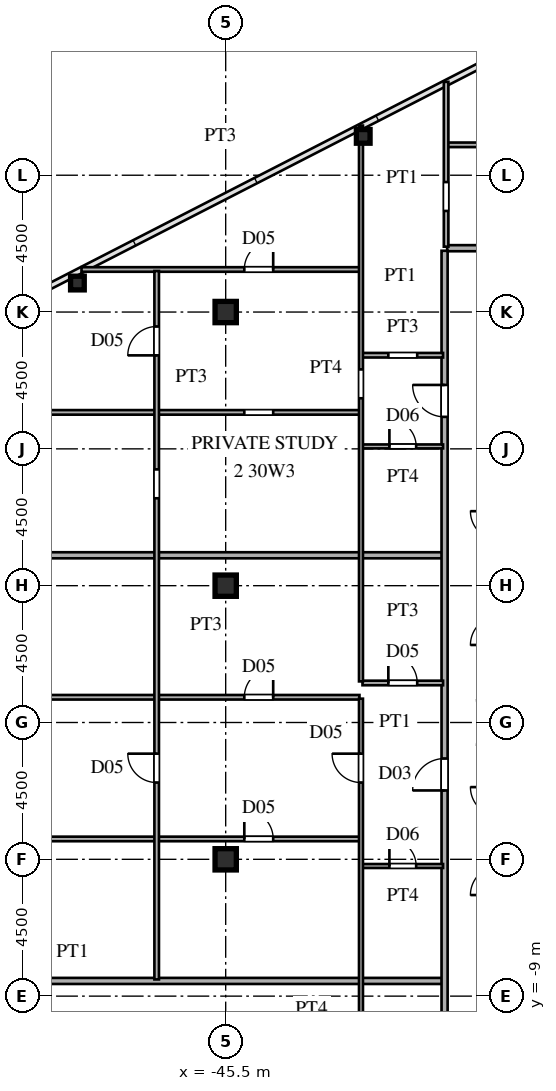
"""IFC4 building model, lengths in metres.
Left out: names, types, materials, properties, quantities, classifications, styles, units other than length and angle.
Written with IfcOpenShell. Run it as: python <this file> out.ifc"""

import sys

from ifc_helpers import new_model, si_unit, direction, frame, frame_2d, origin, origin_2d, place, context, subcontext, project, spatial, rectangle, hollow_rectangle, i_section, extrude, source, transform, mapped, element, fill, save


model = new_model("IFC4")
c1 = context("Model", 3, precision=1e-05, world=origin(), true_north=direction((0.0, 1.0)))
c2 = subcontext(c1, "Body", "Model", "MODEL_VIEW")
j1 = project(units=[si_unit("LENGTHUNIT", "METRE"), si_unit("PLANEANGLEUNIT", "RADIAN")], contexts=[c1])
p1 = place(None, origin())
s1 = spatial("IfcSite", under=j1, at=p1, CompositionType="ELEMENT")
p2 = place(p1, origin())
s2 = spatial("IfcBuilding", under=s1, at=p2, CompositionType="ELEMENT")
p3 = place(p2, frame((0.0, 0.0, 114.0)))
s3 = spatial("IfcBuildingStorey", under=s2, at=p3, CompositionType="ELEMENT", Elevation=114.0)
m1 = source(origin(), c2, "Body", "SweptSolid", [
    extrude(i_section(OverallWidth=0.7, OverallDepth=0.7, WebThickness=0.028, FlangeThickness=0.045, at=origin_2d()), origin(), (0.0, 0.0, 1.0), 3.6),
])
for number, where, z_axis, x_axis in (
    (1, (-45.5, -4.5, 0.0), (0.0, 0.0, 1.0), (1.0, 0.0, 0.0)),
    (2, (-45.5, 4.5, 0.0), (0.0, 0.0, 1.0), (1.0, 0.0, 0.0)),
    (3, (-45.5, 13.5, 0.0), (0.0, 0.0, 1.0), (1.0, 0.0, 0.0)),
):
    element("IfcColumn", number, at=place(p3, frame(where, z_axis=z_axis, x_axis=x_axis)), inside=s3, PredefinedType="COLUMN", context=c2, shape_type="MappedRepresentation", body=[
        mapped(m1, transform((0.0, 0.0, 0.0), scale=1.0)),
    ])
m2 = source(origin(), c2, "Body", "SweptSolid", [
    extrude(hollow_rectangle(XDim=0.45, YDim=0.45, WallThickness=0.018, at=origin_2d()), origin(), (0.0, 0.0, 1.0), 3.6),
])
for number, where, z_axis, x_axis in (
    (4, (-40.976, 19.278, 0.0), (0.0, 0.0, 1.0), (1.0, 0.0, 0.0)),
    (5, (-50.377, 14.453, 0.0), (0.0, 0.0, 1.0), (1.0, 0.0, 0.0)),
):
    element("IfcColumn", number, at=place(p3, frame(where, z_axis=z_axis, x_axis=x_axis)), inside=s3, PredefinedType="COLUMN", context=c2, shape_type="MappedRepresentation", body=[
        mapped(m2, transform((0.0, 0.0, 0.0), scale=1.0)),
    ])
p4 = place(p3, frame((-62.69, -8.5, 0.0), z_axis=(0.0, 0.0, 1.0), x_axis=(1.0, 0.0, 0.0)))
e6 = element("IfcWall", 6, at=p4, inside=s3, PredefinedType="PARTITIONING", context=c2, shape_type="SweptSolid", body=[
    extrude(rectangle(XDim=24.31, YDim=0.2, at=frame_2d((12.155, 0.0))), origin(), (0.0, 0.0, 1.0), 3.38),
])
p5 = place(p3, frame((-41.0, -4.72, 0.0), z_axis=(0.0, 0.0, 1.0), x_axis=(1.0, 0.0, 0.0)))
e7 = element("IfcWall", 7, at=p5, inside=s3, PredefinedType="PARTITIONING", context=c2, shape_type="SweptSolid", body=[
    extrude(rectangle(XDim=2.65, YDim=0.13, at=frame_2d((1.325, 0.0))), origin(), (0.0, 0.0, 1.0), 3.38),
])
p6 = place(p5, frame((0.885, 0.0, 0.0)))
e8 = element("IfcOpeningElement", 8, at=p6, cuts=e7, PredefinedType="OPENING", context=c2, shape_type="SweptSolid", body=[
    extrude(rectangle(XDim=0.88, YDim=2.1, at=frame_2d((0.44, 1.05))), frame((0.0, 0.075, 0.0), z_axis=(0.0, -1.0, 0.0), x_axis=(1.0, 0.0, 0.0)), (0.0, 0.0, 1.0), 0.15),
])
p7 = place(p3, frame((-69.535, -3.83, 0.0), z_axis=(0.0, 0.0, 1.0), x_axis=(1.0, 0.0, 0.0)))
e9 = element("IfcWall", 9, at=p7, inside=s3, PredefinedType="PARTITIONING", context=c2, shape_type="SweptSolid", body=[
    extrude(rectangle(XDim=28.435, YDim=0.15, at=frame_2d((14.217, 0.0))), origin(), (0.0, 0.0, 1.0), 3.38),
])
p8 = place(p7, frame((24.647, 0.0, 0.0)))
e10 = element("IfcOpeningElement", 10, at=p8, cuts=e9, PredefinedType="OPENING", context=c2, shape_type="SweptSolid", body=[
    extrude(rectangle(XDim=0.95, YDim=2.15, at=frame_2d((0.475, 1.075))), frame((0.0, 0.085, 0.0), z_axis=(0.0, -1.0, 0.0), x_axis=(1.0, 0.0, 0.0)), (0.0, 0.0, 1.0), 0.17),
])
p9 = place(p7, frame((11.71, 0.0, 0.0)))
e11 = element("IfcOpeningElement", 11, at=p9, cuts=e9, PredefinedType="OPENING", context=c2, shape_type="SweptSolid", body=[
    extrude(rectangle(XDim=0.95, YDim=2.15, at=frame_2d((0.475, 1.075))), frame((0.0, 0.085, 0.0), z_axis=(0.0, -1.0, 0.0), x_axis=(1.0, 0.0, 0.0)), (0.0, 0.0, 1.0), 0.17),
])
p10 = place(p3, frame((-69.535, 0.83, 0.0), z_axis=(0.0, 0.0, 1.0), x_axis=(1.0, 0.0, 0.0)))
e12 = element("IfcWall", 12, at=p10, inside=s3, PredefinedType="PARTITIONING", context=c2, shape_type="SweptSolid", body=[
    extrude(rectangle(XDim=28.435, YDim=0.15, at=frame_2d((14.217, 0.0))), origin(), (0.0, 0.0, 1.0), 3.38),
])
p11 = place(p10, frame((24.647, 0.0, 0.0)))
e13 = element("IfcOpeningElement", 13, at=p11, cuts=e12, PredefinedType="OPENING", context=c2, shape_type="SweptSolid", body=[
    extrude(rectangle(XDim=0.95, YDim=2.15, at=frame_2d((0.475, 1.075))), frame((0.0, 0.085, 0.0), z_axis=(0.0, -1.0, 0.0), x_axis=(1.0, 0.0, 0.0)), (0.0, 0.0, 1.0), 0.17),
])
p12 = place(p10, frame((11.71, 0.0, 0.0)))
e14 = element("IfcOpeningElement", 14, at=p12, cuts=e12, PredefinedType="OPENING", context=c2, shape_type="SweptSolid", body=[
    extrude(rectangle(XDim=0.95, YDim=2.15, at=frame_2d((0.475, 1.075))), frame((0.0, 0.085, 0.0), z_axis=(0.0, -1.0, 0.0), x_axis=(1.0, 0.0, 0.0)), (0.0, 0.0, 1.0), 0.17),
])
p13 = place(p3, frame((-41.0, 1.3, 0.0), z_axis=(0.0, 0.0, 1.0), x_axis=(1.0, 0.0, 0.0)))
e15 = element("IfcWall", 15, at=p13, inside=s3, PredefinedType="PARTITIONING", context=c2, shape_type="SweptSolid", body=[
    extrude(rectangle(XDim=2.65, YDim=0.15, at=frame_2d((1.325, 0.0))), origin(), (0.0, 0.0, 1.0), 3.38),
])
p14 = place(p13, frame((0.85, 0.0, 0.0)))
e16 = element("IfcOpeningElement", 16, at=p14, cuts=e15, PredefinedType="OPENING", context=c2, shape_type="SweptSolid", body=[
    extrude(rectangle(XDim=0.95, YDim=2.15, at=frame_2d((0.475, 1.075))), frame((0.0, 0.085, 0.0), z_axis=(0.0, -1.0, 0.0), x_axis=(1.0, 0.0, 0.0)), (0.0, 0.0, 1.0), 0.17),
])
p15 = place(p3, frame((-68.458, 5.5, 0.0), z_axis=(0.0, 0.0, 1.0), x_axis=(1.0, 0.0, 0.0)))
e17 = element("IfcWall", 17, at=p15, inside=s3, PredefinedType="PARTITIONING", context=c2, shape_type="SweptSolid", body=[
    extrude(rectangle(XDim=30.079, YDim=0.2, at=frame_2d((15.039, 0.0))), origin(), (0.0, 0.0, 1.0), 3.38),
])
p16 = place(p3, frame((-41.0, 9.08, 0.0), z_axis=(0.0, 0.0, 1.0), x_axis=(1.0, 0.0, 0.0)))
e18 = element("IfcWall", 18, at=p16, inside=s3, PredefinedType="PARTITIONING", context=c2, shape_type="SweptSolid", body=[
    extrude(rectangle(XDim=2.65, YDim=0.13, at=frame_2d((1.325, 0.0))), origin(), (0.0, 0.0, 1.0), 3.38),
])
p17 = place(p16, frame((0.885, 0.0, 0.0)))
e19 = element("IfcOpeningElement", 19, at=p17, cuts=e18, PredefinedType="OPENING", context=c2, shape_type="SweptSolid", body=[
    extrude(rectangle(XDim=0.88, YDim=2.1, at=frame_2d((0.44, 1.05))), frame((0.0, 0.075, 0.0), z_axis=(0.0, -1.0, 0.0), x_axis=(1.0, 0.0, 0.0)), (0.0, 0.0, 1.0), 0.15),
])
p18 = place(p3, frame((-54.45, 10.2, 0.0), z_axis=(0.0, 0.0, 1.0), x_axis=(1.0, 0.0, 0.0)))
e20 = element("IfcWall", 20, at=p18, inside=s3, PredefinedType="PARTITIONING", context=c2, shape_type="SweptSolid", body=[
    extrude(rectangle(XDim=13.35, YDim=0.15, at=frame_2d((6.675, 0.0))), origin(), (0.0, 0.0, 1.0), 3.38),
])
p19 = place(p18, frame((9.562, 0.0, 0.0)))
e21 = element("IfcOpeningElement", 21, at=p19, cuts=e20, PredefinedType="OPENING", context=c2, shape_type="SweptSolid", body=[
    extrude(rectangle(XDim=0.95, YDim=2.15, at=frame_2d((0.475, 1.075))), frame((0.0, 0.085, 0.0), z_axis=(0.0, -1.0, 0.0), x_axis=(1.0, 0.0, 0.0)), (0.0, 0.0, 1.0), 0.17),
])
p20 = place(p3, frame((-41.0, 12.08, 0.0), z_axis=(0.0, 0.0, 1.0), x_axis=(1.0, 0.0, 0.0)))
e22 = element("IfcWall", 22, at=p20, inside=s3, PredefinedType="PARTITIONING", context=c2, shape_type="SweptSolid", body=[
    extrude(rectangle(XDim=2.65, YDim=0.15, at=frame_2d((1.325, 0.0))), origin(), (0.0, 0.0, 1.0), 3.38),
])
p21 = place(p20, frame((0.85, 0.0, 0.0)))
e23 = element("IfcOpeningElement", 23, at=p21, cuts=e22, PredefinedType="OPENING", context=c2, shape_type="SweptSolid", body=[
    extrude(rectangle(XDim=0.95, YDim=2.15, at=frame_2d((0.475, 1.075))), frame((0.0, 0.085, 0.0), z_axis=(0.0, -1.0, 0.0), x_axis=(1.0, 0.0, 0.0)), (0.0, 0.0, 1.0), 0.17),
])
p22 = place(p3, frame((-50.243, 14.9, 0.0), z_axis=(0.0, 0.0, 1.0), x_axis=(1.0, 0.0, 0.0)))
e24 = element("IfcWall", 24, at=p22, inside=s3, PredefinedType="PARTITIONING", context=c2, shape_type="SweptSolid", body=[
    extrude(rectangle(XDim=9.143, YDim=0.15, at=frame_2d((4.571, 0.0))), origin(), (0.0, 0.0, 1.0), 3.38),
])
p23 = place(p22, frame((5.355, 0.0, 0.0)))
e25 = element("IfcOpeningElement", 25, at=p23, cuts=e24, PredefinedType="OPENING", context=c2, shape_type="SweptSolid", body=[
    extrude(rectangle(XDim=0.95, YDim=2.15, at=frame_2d((0.475, 1.075))), frame((0.0, 0.085, 0.0), z_axis=(0.0, -1.0, 0.0), x_axis=(1.0, 0.0, 0.0)), (0.0, 0.0, 1.0), 0.17),
])
p24 = place(p3, frame((-38.215, 15.6, 0.0), z_axis=(0.0, 0.0, 1.0), x_axis=(1.0, 0.0, 0.0)))
e26 = element("IfcWall", 26, at=p24, inside=s3, PredefinedType="PARTITIONING", context=c2, shape_type="SweptSolid", body=[
    extrude(rectangle(XDim=1.63, YDim=0.2, at=frame_2d((0.815, 0.0))), origin(), (0.0, 0.0, 1.0), 3.38),
])
p25 = place(p3, frame((-38.2, 19.0, 0.0), z_axis=(0.0, 0.0, 1.0), x_axis=(1.0, 0.0, 0.0)))
e27 = element("IfcWall", 27, at=p25, inside=s3, PredefinedType="PARTITIONING", context=c2, shape_type="SweptSolid", body=[
    extrude(rectangle(XDim=10.735, YDim=0.15, at=frame_2d((5.367, 0.0))), origin(), (0.0, 0.0, 1.0), 3.38),
])
p26 = place(p25, frame((4.85, 0.0, 0.0)))
e28 = element("IfcOpeningElement", 28, at=p26, cuts=e27, PredefinedType="OPENING", context=c2, shape_type="SweptSolid", body=[
    extrude(rectangle(XDim=0.95, YDim=2.15, at=frame_2d((0.475, 1.075))), frame((0.0, 0.085, 0.0), z_axis=(0.0, -1.0, 0.0), x_axis=(1.0, 0.0, 0.0)), (0.0, 0.0, 1.0), 0.17),
])
p27 = place(p3, frame((-47.77, -8.45, 0.0), z_axis=(0.0, 0.0, 1.0), x_axis=(0.0, 1.0, 0.0)))
e29 = element("IfcWall", 29, at=p27, inside=s3, PredefinedType="PARTITIONING", context=c2, shape_type="SweptSolid", body=[
    extrude(rectangle(XDim=23.3, YDim=0.15, at=frame_2d((11.65, 0.0))), origin(), (0.0, 0.0, 1.0), 3.38),
])
p28 = place(p27, frame((6.475, 0.0, 0.0)))
e30 = element("IfcOpeningElement", 30, at=p28, cuts=e29, PredefinedType="OPENING", context=c2, shape_type="SweptSolid", body=[
    extrude(rectangle(XDim=0.95, YDim=2.15, at=frame_2d((0.475, 1.075))), frame((0.0, 0.085, 0.0), z_axis=(0.0, -1.0, 0.0), x_axis=(1.0, 0.0, 0.0)), (0.0, 0.0, 1.0), 0.17),
])
p29 = place(p27, frame((20.525, 0.0, 0.0)))
e31 = element("IfcOpeningElement", 31, at=p29, cuts=e29, PredefinedType="OPENING", context=c2, shape_type="SweptSolid", body=[
    extrude(rectangle(XDim=0.95, YDim=2.15, at=frame_2d((0.475, 1.075))), frame((0.0, 0.085, 0.0), z_axis=(0.0, -1.0, 0.0), x_axis=(1.0, 0.0, 0.0)), (0.0, 0.0, 1.0), 0.17),
])
p30 = place(p27, frame((15.825, 0.0, 0.0)))
e32 = element("IfcOpeningElement", 32, at=p30, cuts=e29, PredefinedType="OPENING", context=c2, shape_type="SweptSolid", body=[
    extrude(rectangle(XDim=0.95, YDim=2.15, at=frame_2d((0.475, 1.075))), frame((0.0, 0.085, 0.0), z_axis=(0.0, -1.0, 0.0), x_axis=(1.0, 0.0, 0.0)), (0.0, 0.0, 1.0), 0.17),
])
p31 = place(p3, frame((-41.05, -19.634, 0.0), z_axis=(0.0, 0.0, 1.0), x_axis=(0.0, 1.0, 0.0)))
e33 = element("IfcWall", 33, at=p31, inside=s3, PredefinedType="PARTITIONING", context=c2, shape_type="SweptSolid", body=[
    extrude(rectangle(XDim=20.417, YDim=0.13, at=frame_2d((10.208, 0.0))), origin(), (0.0, 0.0, 1.0), 2.99),
])
p32 = place(p31, frame((5.987, 0.0, 0.0)))
e34 = element("IfcOpeningElement", 34, at=p32, cuts=e33, PredefinedType="OPENING", context=c2, shape_type="SweptSolid", body=[
    extrude(rectangle(XDim=0.95, YDim=2.15, at=frame_2d((0.475, 1.075))), frame((0.0, 0.075, 0.0), z_axis=(0.0, -1.0, 0.0), x_axis=(1.0, 0.0, 0.0)), (0.0, 0.0, 1.0), 0.15),
])
p33 = place(p31, frame((17.659, 0.0, 0.0)))
e35 = element("IfcOpeningElement", 35, at=p33, cuts=e33, PredefinedType="OPENING", context=c2, shape_type="SweptSolid", body=[
    extrude(rectangle(XDim=0.95, YDim=2.15, at=frame_2d((0.475, 1.075))), frame((0.0, 0.075, 0.0), z_axis=(0.0, -1.0, 0.0), x_axis=(1.0, 0.0, 0.0)), (0.0, 0.0, 1.0), 0.15),
])
p34 = place(p3, frame((-41.05, 1.352, 0.0), z_axis=(0.0, 0.0, 1.0), x_axis=(0.0, 1.0, 0.0)))
e36 = element("IfcWall", 36, at=p34, inside=s3, PredefinedType="PARTITIONING", context=c2, shape_type="SweptSolid", body=[
    extrude(rectangle(XDim=18.282, YDim=0.13, at=frame_2d((9.141, 0.0))), origin(), (0.0, 0.0, 1.0), 2.99),
])
p35 = place(p34, frame((9.312, 0.0, 0.0)))
e37 = element("IfcOpeningElement", 37, at=p35, cuts=e36, PredefinedType="OPENING", context=c2, shape_type="SweptSolid", body=[
    extrude(rectangle(XDim=0.95, YDim=2.15, at=frame_2d((0.475, 1.075))), frame((0.0, 0.075, 0.0), z_axis=(0.0, -1.0, 0.0), x_axis=(1.0, 0.0, 0.0)), (0.0, 0.0, 1.0), 0.15),
])
p36 = place(p3, frame((-38.3, -15.515, 0.0), z_axis=(0.0, 0.0, 1.0), x_axis=(0.0, 1.0, 0.0)))
e38 = element("IfcWall", 38, at=p36, inside=s3, PredefinedType="PARTITIONING", context=c2, shape_type="SweptSolid", body=[
    extrude(rectangle(XDim=31.03, YDim=0.2, at=frame_2d((15.515, 0.0))), origin(), (0.0, 0.0, 1.0), 3.38),
])
p37 = place(p36, frame((2.345, 0.0, 0.0)))
e39 = element("IfcOpeningElement", 39, at=p37, cuts=e38, PredefinedType="OPENING", context=c2, shape_type="SweptSolid", body=[
    extrude(rectangle(XDim=1.05, YDim=2.25, at=frame_2d((0.525, 1.125))), frame((0.0, 0.11, 0.0), z_axis=(0.0, -1.0, 0.0), x_axis=(1.0, 0.0, 0.0)), (0.0, 0.0, 1.0), 0.22),
])
p38 = place(p36, frame((13.28, 0.0, 0.0)))
e40 = element("IfcOpeningElement", 40, at=p38, cuts=e38, PredefinedType="OPENING", context=c2, shape_type="SweptSolid", body=[
    extrude(rectangle(XDim=1.05, YDim=2.25, at=frame_2d((0.525, 1.125))), frame((0.0, 0.11, 0.0), z_axis=(0.0, -1.0, 0.0), x_axis=(1.0, 0.0, 0.0)), (0.0, 0.0, 1.0), 0.22),
])
p39 = place(p36, frame((25.567, 0.0, 0.0)))
e41 = element("IfcOpeningElement", 41, at=p39, cuts=e38, PredefinedType="OPENING", context=c2, shape_type="SweptSolid", body=[
    extrude(rectangle(XDim=1.05, YDim=2.25, at=frame_2d((0.525, 1.125))), frame((0.0, 0.11, 0.0), z_axis=(0.0, -1.0, 0.0), x_axis=(1.0, 0.0, 0.0)), (0.0, 0.0, 1.0), 0.22),
])
p40 = place(p3, frame((-38.25, 15.65, 0.0), z_axis=(0.0, 0.0, 1.0), x_axis=(0.0, 1.0, 0.0)))
e42 = element("IfcWall", 42, at=p40, inside=s3, PredefinedType="PARTITIONING", context=c2, shape_type="SweptSolid", body=[
    extrude(rectangle(XDim=5.421, YDim=0.15, at=frame_2d((2.71, 0.0))), origin(), (0.0, 0.0, 1.0), 3.38),
])
p41 = place(p40, frame((1.175, 0.0, 0.0)))
e43 = element("IfcOpeningElement", 43, at=p41, cuts=e42, PredefinedType="OPENING", context=c2, shape_type="SweptSolid", body=[
    extrude(rectangle(XDim=0.95, YDim=2.15, at=frame_2d((0.475, 1.075))), frame((0.0, 0.085, 0.0), z_axis=(0.0, -1.0, 0.0), x_axis=(1.0, 0.0, 0.0)), (0.0, 0.0, 1.0), 0.17),
])
m3 = source(origin(), c2, "Body", "SweptSolid", [
    extrude(rectangle(XDim=0.88, YDim=2.1, at=frame_2d((0.44, 1.05))), frame((0.0, 0.025, 0.0), z_axis=(0.0, -1.0, 0.0), x_axis=(1.0, 0.0, 0.0)), (0.0, 0.0, 1.0), 0.05),
])
p42 = place(p6, origin())
e44 = element("IfcDoor", 44, at=p42, inside=s3, OperationType="SINGLE_SWING_LEFT", PredefinedType="DOOR", context=c2, shape_type="MappedRepresentation", body=[
    mapped(m3, transform((0.0, 0.0, 0.0), scale=1.0)),
])
fill(e8, e44)
m4 = source(origin(), c2, "Body", "SweptSolid", [
    extrude(rectangle(XDim=0.95, YDim=2.15, at=frame_2d((0.475, 1.075))), frame((0.0, 0.025, 0.0), z_axis=(0.0, -1.0, 0.0), x_axis=(1.0, 0.0, 0.0)), (0.0, 0.0, 1.0), 0.05),
])
p43 = place(p8, origin())
e45 = element("IfcDoor", 45, at=p43, inside=s3, OperationType="SINGLE_SWING_LEFT", PredefinedType="DOOR", context=c2, shape_type="MappedRepresentation", body=[
    mapped(m4, transform((0.0, 0.0, 0.0), scale=1.0)),
])
fill(e10, e45)
p44 = place(p11, origin())
e46 = element("IfcDoor", 46, at=p44, inside=s3, OperationType="SINGLE_SWING_RIGHT", PredefinedType="DOOR", context=c2, shape_type="MappedRepresentation", body=[
    mapped(m4, transform((0.0, 0.0, 0.0), scale=1.0)),
])
fill(e13, e46)
p45 = place(p14, origin())
e47 = element("IfcDoor", 47, at=p45, inside=s3, OperationType="SINGLE_SWING_LEFT", PredefinedType="DOOR", context=c2, shape_type="MappedRepresentation", body=[
    mapped(m4, transform((0.0, 0.0, 0.0), scale=1.0)),
])
fill(e16, e47)
p46 = place(p17, origin())
e48 = element("IfcDoor", 48, at=p46, inside=s3, OperationType="SINGLE_SWING_LEFT", PredefinedType="DOOR", context=c2, shape_type="MappedRepresentation", body=[
    mapped(m3, transform((0.0, 0.0, 0.0), scale=1.0)),
])
fill(e19, e48)
p47 = place(p23, origin())
e49 = element("IfcDoor", 49, at=p47, inside=s3, OperationType="SINGLE_SWING_RIGHT", PredefinedType="DOOR", context=c2, shape_type="MappedRepresentation", body=[
    mapped(m4, transform((0.0, 0.0, 0.0), scale=1.0)),
])
fill(e25, e49)
p48 = place(p28, origin())
e50 = element("IfcDoor", 50, at=p48, inside=s3, OperationType="SINGLE_SWING_RIGHT", PredefinedType="DOOR", context=c2, shape_type="MappedRepresentation", body=[
    mapped(m4, transform((0.0, 0.0, 0.0), scale=1.0)),
])
fill(e30, e50)
p49 = place(p29, origin())
e51 = element("IfcDoor", 51, at=p49, inside=s3, OperationType="SINGLE_SWING_LEFT", PredefinedType="DOOR", context=c2, shape_type="MappedRepresentation", body=[
    mapped(m4, transform((0.0, 0.0, 0.0), scale=1.0)),
])
fill(e31, e51)
p50 = place(p33, origin())
e52 = element("IfcDoor", 52, at=p50, inside=s3, OperationType="SINGLE_SWING_RIGHT", PredefinedType="DOOR", context=c2, shape_type="MappedRepresentation", body=[
    mapped(m4, transform((0.0, 0.0, 0.0), scale=1.0)),
])
fill(e35, e52)
m5 = source(origin(), c2, "Body", "SweptSolid", [
    extrude(rectangle(XDim=1.05, YDim=2.25, at=frame_2d((0.525, 1.125))), frame((0.0, 0.025, 0.0), z_axis=(0.0, -1.0, 0.0), x_axis=(1.0, 0.0, 0.0)), (0.0, 0.0, 1.0), 0.05),
])
p51 = place(p38, origin())
e53 = element("IfcDoor", 53, at=p51, inside=s3, OperationType="SINGLE_SWING_LEFT", PredefinedType="DOOR", context=c2, shape_type="MappedRepresentation", body=[
    mapped(m5, transform((0.0, 0.0, 0.0), scale=1.0)),
])
fill(e40, e53)
p52 = place(p39, origin())
e54 = element("IfcDoor", 54, at=p52, inside=s3, OperationType="SINGLE_SWING_RIGHT", PredefinedType="DOOR", context=c2, shape_type="MappedRepresentation", body=[
    mapped(m5, transform((0.0, 0.0, 0.0), scale=1.0)),
])
fill(e41, e54)
save(model, sys.argv[1])
